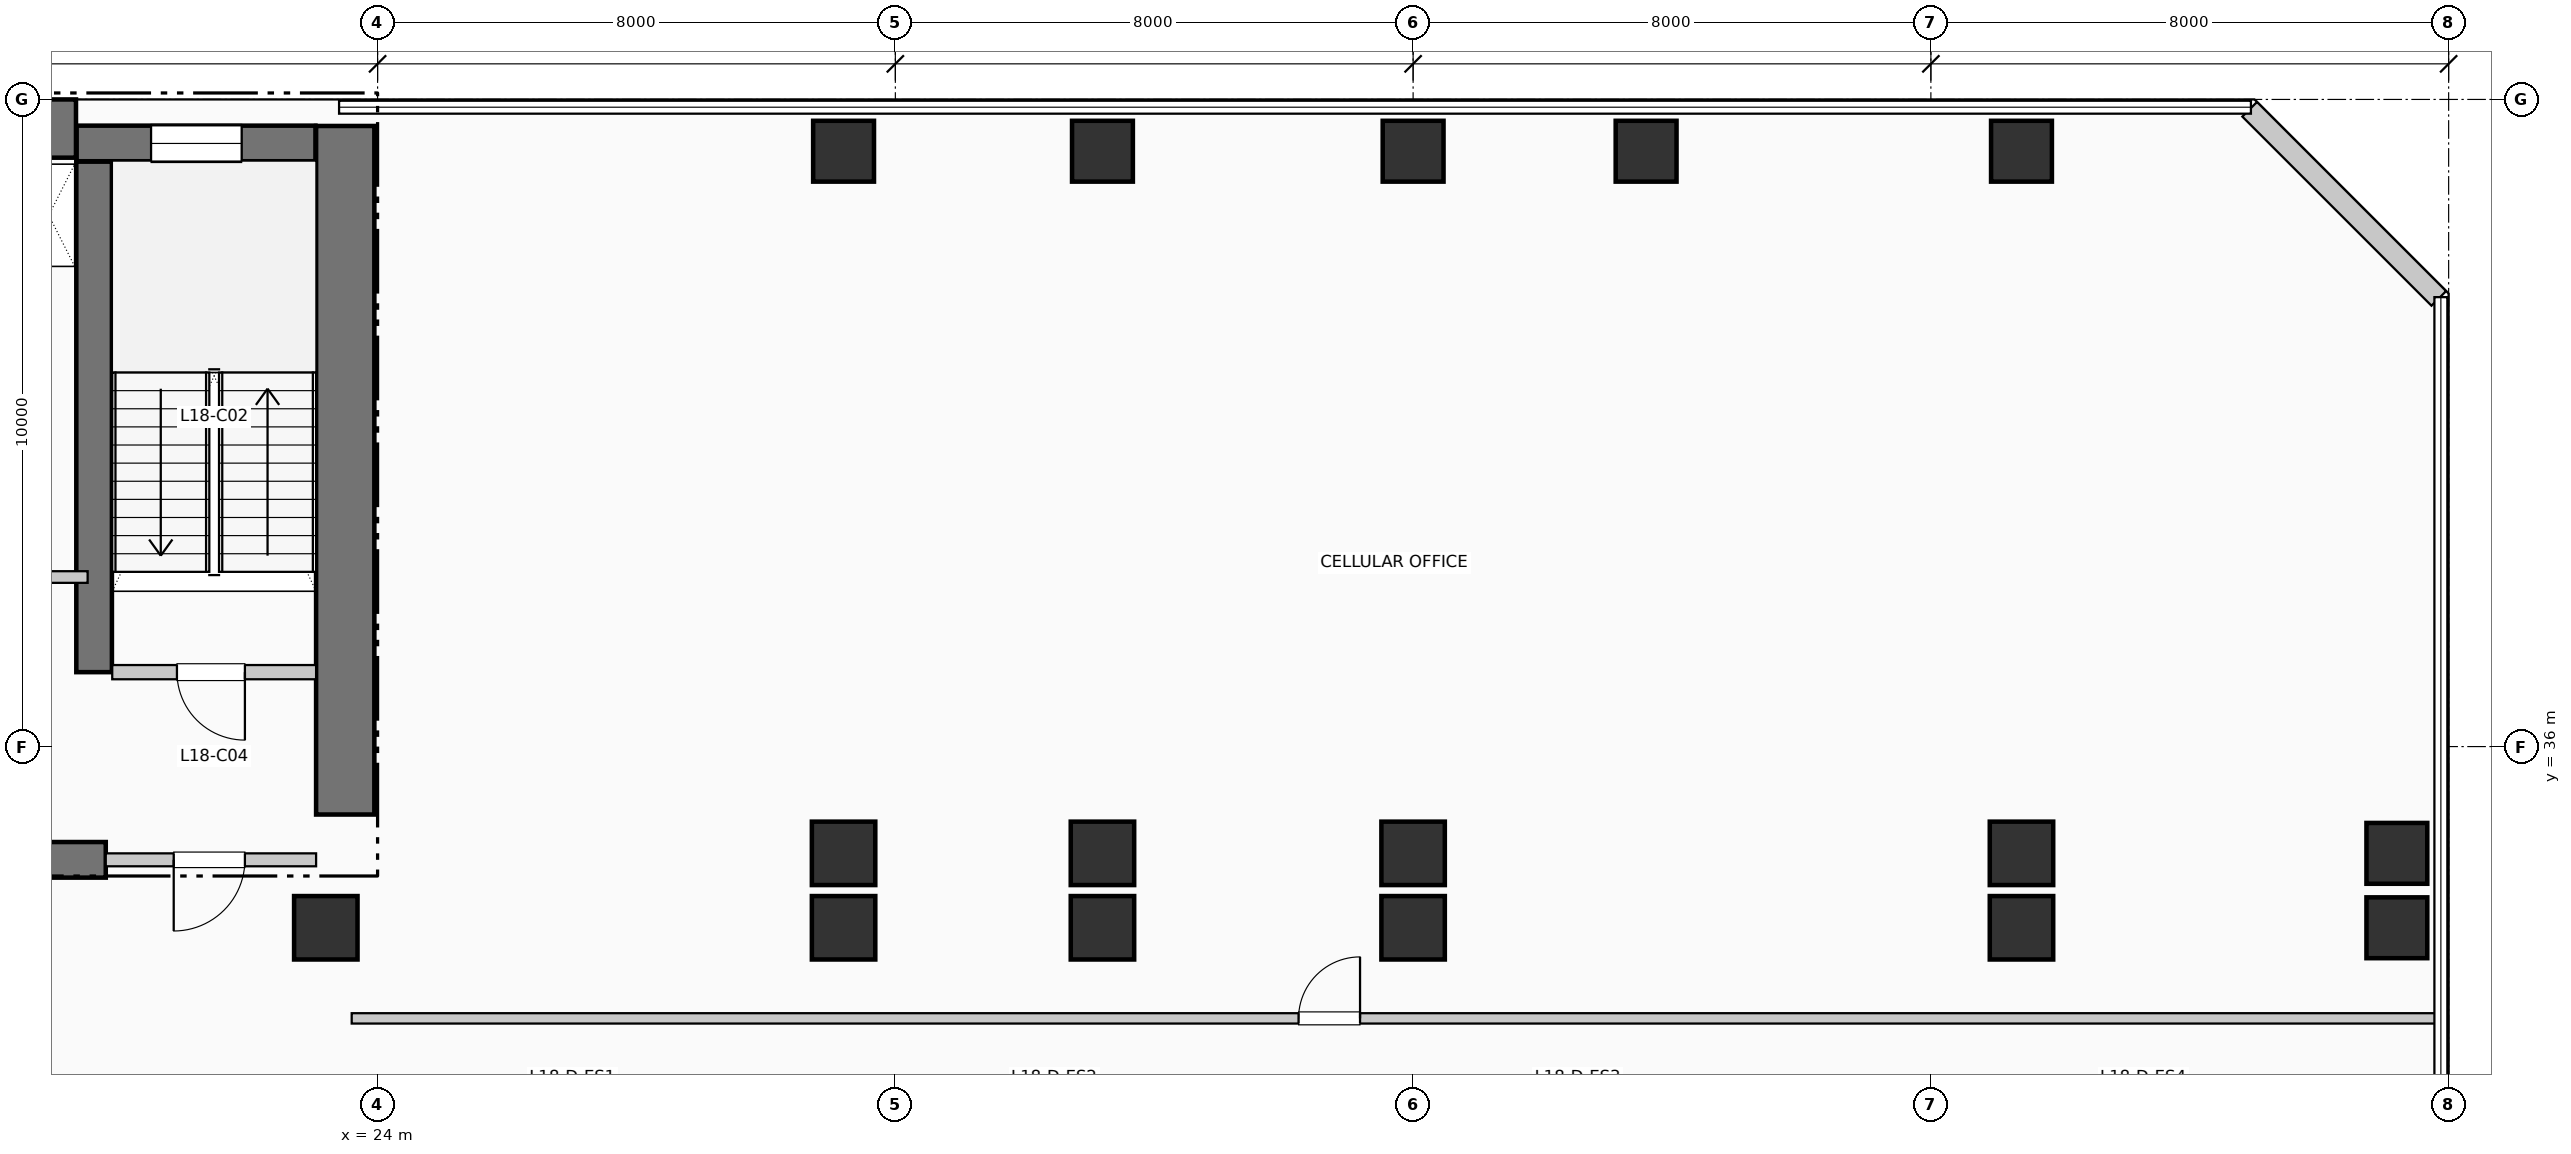
"""IFC4 building model, lengths in metres.
Left out: names, types, materials, properties, quantities, classifications, styles, units other than length and angle.
Written with IfcOpenShell. Run it as: python <this file> out.ifc"""

import sys

from ifc_helpers import new_model, si_unit, direction, frame, frame_2d, origin, origin_2d, place, context, subcontext, project, spatial, rectangle, extrude, element, fill, save


model = new_model("IFC4")
c1 = context("Model", 3, precision=1e-05, world=origin(), true_north=direction((0.0, 1.0)))
c2 = subcontext(c1, "Body", "Model", "MODEL_VIEW")
j1 = project(units=[si_unit("LENGTHUNIT", "METRE"), si_unit("PLANEANGLEUNIT", "RADIAN")], contexts=[c1])
p1 = place(None, origin())
s1 = spatial("IfcSite", under=j1, at=p1, CompositionType="ELEMENT")
p2 = place(p1, origin())
s2 = spatial("IfcBuilding", under=s1, at=p2, CompositionType="ELEMENT")
p3 = place(p2, frame((0.0, 0.0, 77.88)))
s3 = spatial("IfcBuildingStorey", under=s2, at=p3, CompositionType="ELEMENT", Elevation=77.88)
p4 = place(p3, frame((5.36, 45.55, 0.0), z_axis=(0.0, 0.0, 1.0), x_axis=(1.0, 0.0, 0.0)))
e1 = element("IfcWall", 1, at=p4, inside=s3, PredefinedType="SHEAR", context=c2, shape_type="SweptSolid", body=[
    extrude(rectangle(XDim=13.98, YDim=0.9, at=frame_2d((6.99, 0.0))), origin(), (0.0, 0.0, 1.0), 3.96),
])
p5 = place(p3, frame((23.5, 34.95, 0.0), z_axis=(0.0, 0.0, 1.0), x_axis=(0.0, 1.0, 0.0)))
e2 = element("IfcWall", 2, at=p5, inside=s3, PredefinedType="SHEAR", context=c2, shape_type="SweptSolid", body=[
    extrude(rectangle(XDim=10.64, YDim=0.9, at=frame_2d((5.32, 0.0))), origin(), (0.0, 0.0, 1.0), 3.96),
])
p6 = place(p3, frame((13.68, 34.25, 0.0), z_axis=(0.0, 0.0, 1.0), x_axis=(1.0, 0.0, 0.0)))
e3 = element("IfcWall", 3, at=p6, inside=s3, PredefinedType="SHEAR", context=c2, shape_type="SweptSolid", body=[
    extrude(rectangle(XDim=6.12, YDim=0.55, at=frame_2d((3.06, 0.0))), origin(), (0.0, 0.0, 1.0), 3.96),
])
p7 = place(p3, frame((19.62, 37.15, 0.0), z_axis=(0.0, 0.0, 1.0), x_axis=(0.0, 1.0, 0.0)))
e4 = element("IfcWall", 4, at=p7, inside=s3, PredefinedType="SHEAR", context=c2, shape_type="SweptSolid", body=[
    extrude(rectangle(XDim=7.89, YDim=0.55, at=frame_2d((3.945, 0.0))), origin(), (0.0, 0.0, 1.0), 3.96),
])
p8 = place(p3, frame((19.35, 45.32, 0.0), z_axis=(0.0, 0.0, 1.0), x_axis=(1.0, 0.0, 0.0)))
e5 = element("IfcWall", 5, at=p8, inside=s3, PredefinedType="SHEAR", context=c2, shape_type="SweptSolid", body=[
    extrude(rectangle(XDim=3.69, YDim=0.55, at=frame_2d((1.845, 0.0))), origin(), (0.0, 0.0, 1.0), 3.96),
])
p9 = place(p8, frame((1.15, 0.0, 1.05)))
e6 = element("IfcOpeningElement", 6, at=p9, cuts=e5, PredefinedType="OPENING", context=c2, shape_type="SweptSolid", body=[
    extrude(rectangle(XDim=1.4, YDim=1.8, at=frame_2d((0.7, 0.9))), frame((0.0, 0.285, 0.0), z_axis=(0.0, -1.0, 0.0), x_axis=(1.0, 0.0, 0.0)), (0.0, 0.0, 1.0), 0.57),
])
for number, where, z_axis, x_axis in (
    (7, (23.2, 33.2, 0.0), (0.0, 0.0, 1.0), (1.0, 0.0, 0.0)),
    (8, (31.2, 33.2, 0.0), (0.0, 0.0, 1.0), (1.0, 0.0, 0.0)),
    (9, (31.2, 34.35, 0.0), (0.0, 0.0, 1.0), (1.0, 0.0, 0.0)),
):
    element("IfcColumn", number, at=place(p3, frame(where, z_axis=z_axis, x_axis=x_axis)), inside=s3, PredefinedType="COLUMN", context=c2, shape_type="SweptSolid", body=[
        extrude(rectangle(XDim=0.98, YDim=0.98, at=origin_2d()), origin(), (0.0, 0.0, 1.0), 3.96),
    ])
p10 = place(p3, frame((31.2, 45.2, 0.0), z_axis=(0.0, 0.0, 1.0), x_axis=(1.0, 0.0, 0.0)))
e10 = element("IfcColumn", 10, at=p10, inside=s3, PredefinedType="COLUMN", context=c2, shape_type="SweptSolid", body=[
    extrude(rectangle(XDim=0.94, YDim=0.94, at=origin_2d()), origin(), (0.0, 0.0, 1.0), 3.96),
])
for number, where, z_axis, x_axis in (
    (11, (35.2, 33.2, 0.0), (0.0, 0.0, 1.0), (1.0, 0.0, 0.0)),
    (12, (35.2, 34.35, 0.0), (0.0, 0.0, 1.0), (1.0, 0.0, 0.0)),
):
    element("IfcColumn", number, at=place(p3, frame(where, z_axis=z_axis, x_axis=x_axis)), inside=s3, PredefinedType="COLUMN", context=c2, shape_type="SweptSolid", body=[
        extrude(rectangle(XDim=0.98, YDim=0.98, at=origin_2d()), origin(), (0.0, 0.0, 1.0), 3.96),
    ])
p11 = place(p3, frame((35.2, 45.2, 0.0), z_axis=(0.0, 0.0, 1.0), x_axis=(1.0, 0.0, 0.0)))
e13 = element("IfcColumn", 13, at=p11, inside=s3, PredefinedType="COLUMN", context=c2, shape_type="SweptSolid", body=[
    extrude(rectangle(XDim=0.94, YDim=0.94, at=origin_2d()), origin(), (0.0, 0.0, 1.0), 3.96),
])
for number, where, z_axis, x_axis in (
    (14, (40.0, 33.2, 0.0), (0.0, 0.0, 1.0), (1.0, 0.0, 0.0)),
    (15, (40.0, 34.35, 0.0), (0.0, 0.0, 1.0), (1.0, 0.0, 0.0)),
):
    element("IfcColumn", number, at=place(p3, frame(where, z_axis=z_axis, x_axis=x_axis)), inside=s3, PredefinedType="COLUMN", context=c2, shape_type="SweptSolid", body=[
        extrude(rectangle(XDim=0.98, YDim=0.98, at=origin_2d()), origin(), (0.0, 0.0, 1.0), 3.96),
    ])
for number, where, z_axis, x_axis in (
    (16, (40.0, 45.2, 0.0), (0.0, 0.0, 1.0), (1.0, 0.0, 0.0)),
    (17, (43.6, 45.2, 0.0), (0.0, 0.0, 1.0), (1.0, 0.0, 0.0)),
):
    element("IfcColumn", number, at=place(p3, frame(where, z_axis=z_axis, x_axis=x_axis)), inside=s3, PredefinedType="COLUMN", context=c2, shape_type="SweptSolid", body=[
        extrude(rectangle(XDim=0.94, YDim=0.94, at=origin_2d()), origin(), (0.0, 0.0, 1.0), 3.96),
    ])
for number, where, z_axis, x_axis in (
    (18, (49.4, 33.2, 0.0), (0.0, 0.0, 1.0), (1.0, 0.0, 0.0)),
    (19, (49.4, 34.35, 0.0), (0.0, 0.0, 1.0), (1.0, 0.0, 0.0)),
):
    element("IfcColumn", number, at=place(p3, frame(where, z_axis=z_axis, x_axis=x_axis)), inside=s3, PredefinedType="COLUMN", context=c2, shape_type="SweptSolid", body=[
        extrude(rectangle(XDim=0.98, YDim=0.98, at=origin_2d()), origin(), (0.0, 0.0, 1.0), 3.96),
    ])
for number, where, z_axis, x_axis in (
    (20, (49.4, 45.2, 0.0), (0.0, 0.0, 1.0), (1.0, 0.0, 0.0)),
    (21, (55.2, 33.2, 0.0), (0.0, 0.0, 1.0), (1.0, 0.0, 0.0)),
    (22, (55.2, 34.35, 0.0), (0.0, 0.0, 1.0), (1.0, 0.0, 0.0)),
):
    element("IfcColumn", number, at=place(p3, frame(where, z_axis=z_axis, x_axis=x_axis)), inside=s3, PredefinedType="COLUMN", context=c2, shape_type="SweptSolid", body=[
        extrude(rectangle(XDim=0.94, YDim=0.94, at=origin_2d()), origin(), (0.0, 0.0, 1.0), 3.96),
    ])
p12 = place(p3, frame((55.848, 42.926, 0.0), z_axis=(0.0, 0.0, 1.0), x_axis=(-0.707106781187, 0.707106781187, 0.0)))
e23 = element("IfcWall", 23, at=p12, inside=s3, PredefinedType="SOLIDWALL", context=c2, shape_type="SweptSolid", body=[
    extrude(rectangle(XDim=4.133, YDim=0.32, at=frame_2d((2.066, 0.0))), origin(), (0.0, 0.0, 1.0), 3.71),
])
p13 = place(p3, frame((19.9, 37.15, 0.0), z_axis=(0.0, 0.0, 1.0), x_axis=(1.0, 0.0, 0.0)))
e24 = element("IfcWall", 24, at=p13, inside=s3, PredefinedType="PARTITIONING", context=c2, shape_type="SweptSolid", body=[
    extrude(rectangle(XDim=3.15, YDim=0.22, at=frame_2d((1.575, 0.0))), origin(), (0.0, 0.0, 1.0), 3.71),
])
p14 = place(p13, frame((2.05, 0.0, 0.0), z_axis=(0.0, 0.0, 1.0), x_axis=(-1.0, 0.0, 0.0)))
e25 = element("IfcOpeningElement", 25, at=p14, cuts=e24, PredefinedType="OPENING", context=c2, shape_type="SweptSolid", body=[
    extrude(rectangle(XDim=1.05, YDim=2.15, at=frame_2d((0.525, 1.075))), frame((0.0, 0.12, 0.0), z_axis=(0.0, -1.0, 0.0), x_axis=(1.0, 0.0, 0.0)), (0.0, 0.0, 1.0), 0.24),
])
p15 = place(p3, frame((19.8, 34.25, 0.0), z_axis=(0.0, 0.0, 1.0), x_axis=(1.0, 0.0, 0.0)))
e26 = element("IfcWall", 26, at=p15, inside=s3, PredefinedType="PARTITIONING", context=c2, shape_type="SweptSolid", body=[
    extrude(rectangle(XDim=3.25, YDim=0.2, at=frame_2d((1.625, 0.0))), origin(), (0.0, 0.0, 1.0), 3.71),
])
p16 = place(p15, frame((2.15, 0.0, 0.0), z_axis=(0.0, 0.0, 1.0), x_axis=(-1.0, 0.0, 0.0)))
e27 = element("IfcOpeningElement", 27, at=p16, cuts=e26, PredefinedType="OPENING", context=c2, shape_type="SweptSolid", body=[
    extrude(rectangle(XDim=1.1, YDim=2.15, at=frame_2d((0.55, 1.075))), frame((0.0, 0.11, 0.0), z_axis=(0.0, -1.0, 0.0), x_axis=(1.0, 0.0, 0.0)), (0.0, 0.0, 1.0), 0.22),
])
p17 = place(p3, frame((17.68, 38.62, 0.0), z_axis=(0.0, 0.0, 1.0), x_axis=(1.0, 0.0, 0.0)))
e28 = element("IfcWall", 28, at=p17, inside=s3, PredefinedType="PARTITIONING", context=c2, shape_type="SweptSolid", body=[
    extrude(rectangle(XDim=1.84, YDim=0.18, at=frame_2d((0.92, 0.0))), origin(), (0.0, 0.0, 1.0), 3.71),
])
p18 = place(p17, frame((0.24, 0.0, 0.0)))
e29 = element("IfcOpeningElement", 29, at=p18, cuts=e28, PredefinedType="OPENING", context=c2, shape_type="SweptSolid", body=[
    extrude(rectangle(XDim=0.92, YDim=2.1, at=frame_2d((0.46, 1.05))), frame((0.0, 0.1, 0.0), z_axis=(0.0, -1.0, 0.0), x_axis=(1.0, 0.0, 0.0)), (0.0, 0.0, 1.0), 0.2),
])
p19 = place(p3, frame((23.6, 31.8, 0.0), z_axis=(0.0, 0.0, 1.0), x_axis=(1.0, 0.0, 0.0)))
e30 = element("IfcWall", 30, at=p19, inside=s3, PredefinedType="PARTITIONING", context=c2, shape_type="SweptSolid", body=[
    extrude(rectangle(XDim=32.21, YDim=0.16, at=frame_2d((16.105, 0.0))), origin(), (0.0, 0.0, 1.0), 3.71),
])
p20 = place(p19, frame((14.63, 0.0, 0.0)))
e31 = element("IfcOpeningElement", 31, at=p20, cuts=e30, PredefinedType="OPENING", context=c2, shape_type="SweptSolid", body=[
    extrude(rectangle(XDim=0.95, YDim=2.15, at=frame_2d((0.475, 1.075))), frame((0.0, 0.09, 0.0), z_axis=(0.0, -1.0, 0.0), x_axis=(1.0, 0.0, 0.0)), (0.0, 0.0, 1.0), 0.18),
])
p21 = place(p9, origin())
e32 = element("IfcWindow", 32, at=p21, inside=s3, PartitioningType="SINGLE_PANEL", PredefinedType="WINDOW", context=c2, shape_type="SweptSolid", body=[
    extrude(rectangle(XDim=1.4, YDim=1.8, at=frame_2d((0.7, 0.9))), frame((0.0, 0.03, 0.0), z_axis=(0.0, -1.0, 0.0), x_axis=(1.0, 0.0, 0.0)), (0.0, 0.0, 1.0), 0.06),
])
fill(e6, e32)
p22 = place(p14, origin())
e33 = element("IfcDoor", 33, at=p22, inside=s3, OperationType="SINGLE_SWING_RIGHT", PredefinedType="DOOR", context=c2, shape_type="SweptSolid", body=[
    extrude(rectangle(XDim=1.05, YDim=2.15, at=frame_2d((0.525, 1.075))), frame((0.0, 0.025, 0.0), z_axis=(0.0, -1.0, 0.0), x_axis=(1.0, 0.0, 0.0)), (0.0, 0.0, 1.0), 0.05),
])
fill(e25, e33)
p23 = place(p16, origin())
e34 = element("IfcDoor", 34, at=p23, inside=s3, OperationType="SINGLE_SWING_LEFT", PredefinedType="DOOR", context=c2, shape_type="SweptSolid", body=[
    extrude(rectangle(XDim=1.1, YDim=2.15, at=frame_2d((0.55, 1.075))), frame((0.0, 0.025, 0.0), z_axis=(0.0, -1.0, 0.0), x_axis=(1.0, 0.0, 0.0)), (0.0, 0.0, 1.0), 0.05),
])
fill(e27, e34)
p24 = place(p20, origin())
e35 = element("IfcDoor", 35, at=p24, inside=s3, OperationType="SINGLE_SWING_RIGHT", PredefinedType="DOOR", context=c2, shape_type="SweptSolid", body=[
    extrude(rectangle(XDim=0.95, YDim=2.15, at=frame_2d((0.475, 1.075))), frame((0.0, 0.025, 0.0), z_axis=(0.0, -1.0, 0.0), x_axis=(1.0, 0.0, 0.0)), (0.0, 0.0, 1.0), 0.05),
])
fill(e31, e35)
save(model, sys.argv[1])
